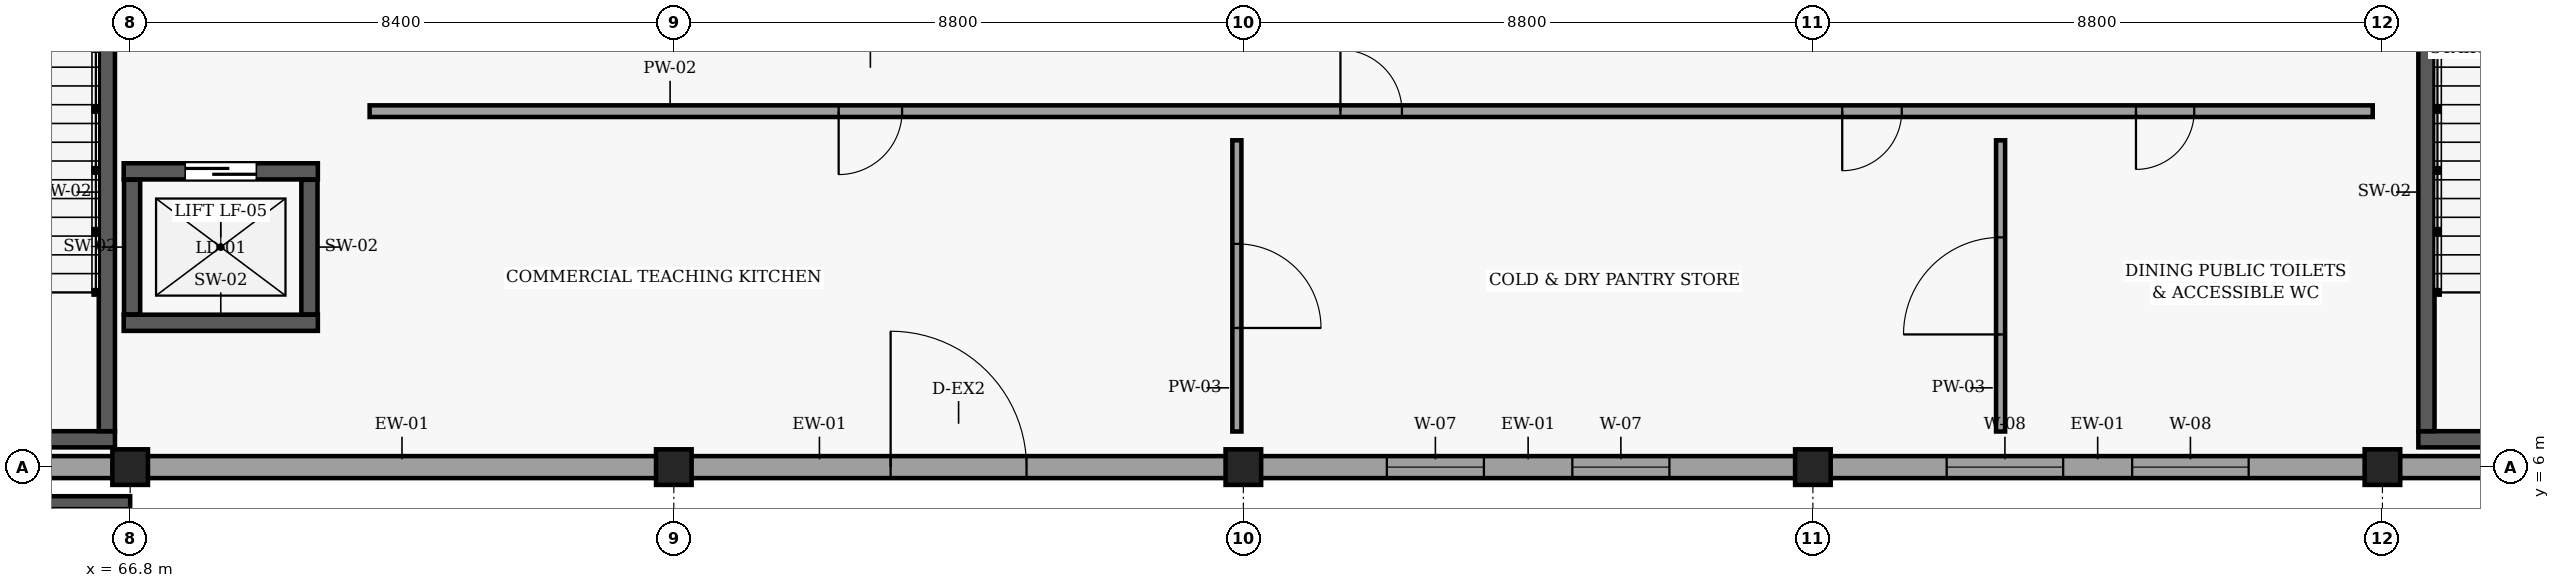
"""IFC4 building model, lengths in metres.
Left out: names, types, materials, properties, quantities, classifications, styles, units other than length and angle.
Written with IfcOpenShell. Run it as: python <this file> out.ifc"""

import sys

from ifc_helpers import new_model, si_unit, direction, frame, frame_2d, origin, origin_2d, place, context, subcontext, project, spatial, rectangle, extrude, element, fill, save


model = new_model("IFC4")
c1 = context("Model", 3, precision=1e-05, world=origin(), true_north=direction((0.0, 1.0)))
c2 = subcontext(c1, "Body", "Model", "MODEL_VIEW")
j1 = project(units=[si_unit("LENGTHUNIT", "METRE"), si_unit("PLANEANGLEUNIT", "RADIAN")], contexts=[c1])
p1 = place(None, origin())
s1 = spatial("IfcSite", under=j1, at=p1, CompositionType="ELEMENT")
p2 = place(p1, origin())
s2 = spatial("IfcBuilding", under=s1, at=p2, CompositionType="ELEMENT")
p3 = place(p2, origin())
s3 = spatial("IfcBuildingStorey", under=s2, at=p3, CompositionType="ELEMENT", Elevation=0.0)
for number, where, z_axis, x_axis in (
    (1, (66.8, 6.0, 0.0), (0.0, 0.0, 1.0), (1.0, 0.0, 0.0)),
    (2, (75.2, 6.0, 0.0), (0.0, 0.0, 1.0), (1.0, 0.0, 0.0)),
    (3, (84.0, 6.0, 0.0), (0.0, 0.0, 1.0), (1.0, 0.0, 0.0)),
    (4, (92.8, 6.0, 0.0), (0.0, 0.0, 1.0), (1.0, 0.0, 0.0)),
    (5, (101.6, 6.0, 0.0), (0.0, 0.0, 1.0), (1.0, 0.0, 0.0)),
):
    element("IfcColumn", number, at=place(p3, frame(where, z_axis=z_axis, x_axis=x_axis)), inside=s3, PredefinedType="COLUMN", context=c2, shape_type="SweptSolid", body=[
        extrude(rectangle(XDim=0.55, YDim=0.55, at=origin_2d()), origin(), (0.0, 0.0, 1.0), 4.8),
    ])
p4 = place(p3, frame((58.5, 6.0, 0.0), z_axis=(0.0, 0.0, 1.0), x_axis=(1.0, 0.0, 0.0)))
e6 = element("IfcWall", 6, at=p4, inside=s3, PredefinedType="SOLIDWALL", context=c2, shape_type="SweptSolid", body=[
    extrude(rectangle(XDim=8.2, YDim=0.34, at=frame_2d((4.1, 0.0))), origin(), (0.0, 0.0, 1.0), 4.065),
])
p5 = place(p3, frame((66.9, 6.0, 0.0), z_axis=(0.0, 0.0, 1.0), x_axis=(1.0, 0.0, 0.0)))
e7 = element("IfcWall", 7, at=p5, inside=s3, PredefinedType="SOLIDWALL", context=c2, shape_type="SweptSolid", body=[
    extrude(rectangle(XDim=8.2, YDim=0.34, at=frame_2d((4.1, 0.0))), origin(), (0.0, 0.0, 1.0), 4.065),
])
p6 = place(p3, frame((75.3, 6.0, 0.0), z_axis=(0.0, 0.0, 1.0), x_axis=(1.0, 0.0, 0.0)))
e8 = element("IfcWall", 8, at=p6, inside=s3, PredefinedType="SOLIDWALL", context=c2, shape_type="SweptSolid", body=[
    extrude(rectangle(XDim=8.6, YDim=0.34, at=frame_2d((4.3, 0.0))), origin(), (0.0, 0.0, 1.0), 4.065),
])
p7 = place(p6, frame((3.25, 0.0, 0.0)))
e9 = element("IfcOpeningElement", 9, at=p7, cuts=e8, PredefinedType="OPENING", context=c2, shape_type="SweptSolid", body=[
    extrude(rectangle(XDim=2.1, YDim=2.35, at=frame_2d((1.05, 1.175))), frame((0.0, 0.18, 0.0), z_axis=(0.0, -1.0, 0.0), x_axis=(1.0, 0.0, 0.0)), (0.0, 0.0, 1.0), 0.36),
])
p8 = place(p3, frame((84.1, 6.0, 0.0), z_axis=(0.0, 0.0, 1.0), x_axis=(1.0, 0.0, 0.0)))
e10 = element("IfcWall", 10, at=p8, inside=s3, PredefinedType="SOLIDWALL", context=c2, shape_type="SweptSolid", body=[
    extrude(rectangle(XDim=8.6, YDim=0.34, at=frame_2d((4.3, 0.0))), origin(), (0.0, 0.0, 1.0), 4.065),
])
p9 = place(p8, frame((2.117, 0.0, 1.1)))
e11 = element("IfcOpeningElement", 11, at=p9, cuts=e10, PredefinedType="OPENING", context=c2, shape_type="SweptSolid", body=[
    extrude(rectangle(XDim=1.5, YDim=1.8, at=frame_2d((0.75, 0.9))), frame((0.0, 0.18, 0.0), z_axis=(0.0, -1.0, 0.0), x_axis=(1.0, 0.0, 0.0)), (0.0, 0.0, 1.0), 0.36),
])
p10 = place(p8, frame((4.983, 0.0, 1.1)))
e12 = element("IfcOpeningElement", 12, at=p10, cuts=e10, PredefinedType="OPENING", context=c2, shape_type="SweptSolid", body=[
    extrude(rectangle(XDim=1.5, YDim=1.8, at=frame_2d((0.75, 0.9))), frame((0.0, 0.18, 0.0), z_axis=(0.0, -1.0, 0.0), x_axis=(1.0, 0.0, 0.0)), (0.0, 0.0, 1.0), 0.36),
])
p11 = place(p3, frame((92.9, 6.0, 0.0), z_axis=(0.0, 0.0, 1.0), x_axis=(1.0, 0.0, 0.0)))
e13 = element("IfcWall", 13, at=p11, inside=s3, PredefinedType="SOLIDWALL", context=c2, shape_type="SweptSolid", body=[
    extrude(rectangle(XDim=8.6, YDim=0.34, at=frame_2d((4.3, 0.0))), origin(), (0.0, 0.0, 1.0), 4.065),
])
p12 = place(p11, frame((1.967, 0.0, 1.1)))
e14 = element("IfcOpeningElement", 14, at=p12, cuts=e13, PredefinedType="OPENING", context=c2, shape_type="SweptSolid", body=[
    extrude(rectangle(XDim=1.8, YDim=1.8, at=frame_2d((0.9, 0.9))), frame((0.0, 0.18, 0.0), z_axis=(0.0, -1.0, 0.0), x_axis=(1.0, 0.0, 0.0)), (0.0, 0.0, 1.0), 0.36),
])
p13 = place(p11, frame((4.833, 0.0, 1.1)))
e15 = element("IfcOpeningElement", 15, at=p13, cuts=e13, PredefinedType="OPENING", context=c2, shape_type="SweptSolid", body=[
    extrude(rectangle(XDim=1.8, YDim=1.8, at=frame_2d((0.9, 0.9))), frame((0.0, 0.18, 0.0), z_axis=(0.0, -1.0, 0.0), x_axis=(1.0, 0.0, 0.0)), (0.0, 0.0, 1.0), 0.36),
])
p14 = place(p3, frame((101.7, 6.0, 0.0), z_axis=(0.0, 0.0, 1.0), x_axis=(1.0, 0.0, 0.0)))
e16 = element("IfcWall", 16, at=p14, inside=s3, PredefinedType="SOLIDWALL", context=c2, shape_type="SweptSolid", body=[
    extrude(rectangle(XDim=8.6, YDim=0.34, at=frame_2d((4.3, 0.0))), origin(), (0.0, 0.0, 1.0), 4.065),
])
p15 = place(p3, frame((58.4, 5.45, 0.0), z_axis=(0.0, 0.0, 1.0), x_axis=(1.0, 0.0, 0.0)))
e17 = element("IfcWall", 17, at=p15, inside=s3, PredefinedType="PARAPET", context=c2, shape_type="SweptSolid", body=[
    extrude(rectangle(XDim=8.4, YDim=0.2, at=frame_2d((4.2, 0.0))), origin(), (0.0, 0.0, 1.0), 1.2),
])
p16 = place(p3, frame((66.565, 6.43, 0.0), z_axis=(0.0, 0.0, 1.0), x_axis=(-1.0, 0.0, 0.0)))
e18 = element("IfcWall", 18, at=p16, inside=s3, PredefinedType="SHEAR", context=c2, shape_type="SweptSolid", body=[
    extrude(rectangle(XDim=3.61, YDim=0.25, at=frame_2d((1.805, 0.0))), origin(), (0.0, 0.0, 1.0), 4.56),
])
p17 = place(p3, frame((66.44, 13.945, 0.0), z_axis=(0.0, 0.0, 1.0), x_axis=(0.0, -1.0, 0.0)))
e19 = element("IfcWall", 19, at=p17, inside=s3, PredefinedType="SHEAR", context=c2, shape_type="SweptSolid", body=[
    extrude(rectangle(XDim=7.39, YDim=0.25, at=frame_2d((3.695, 0.0))), origin(), (0.0, 0.0, 1.0), 4.56),
])
p18 = place(p3, frame((66.7, 8.23, 0.0), z_axis=(0.0, 0.0, 1.0), x_axis=(1.0, 0.0, 0.0)))
e20 = element("IfcWall", 20, at=p18, inside=s3, PredefinedType="SHEAR", context=c2, shape_type="SweptSolid", body=[
    extrude(rectangle(XDim=3.0, YDim=0.25, at=frame_2d((1.5, 0.0))), origin(), (0.0, 0.0, 1.0), 4.56),
])
p19 = place(p3, frame((69.7, 10.57, 0.0), z_axis=(0.0, 0.0, 1.0), x_axis=(-1.0, 0.0, 0.0)))
e21 = element("IfcWall", 21, at=p19, inside=s3, PredefinedType="SHEAR", context=c2, shape_type="SweptSolid", body=[
    extrude(rectangle(XDim=3.0, YDim=0.25, at=frame_2d((1.5, 0.0))), origin(), (0.0, 0.0, 1.0), 4.56),
])
p20 = place(p19, frame((0.95, 0.0, 0.0)))
e22 = element("IfcOpeningElement", 22, at=p20, cuts=e21, PredefinedType="OPENING", context=c2, shape_type="SweptSolid", body=[
    extrude(rectangle(XDim=1.1, YDim=2.15, at=frame_2d((0.55, 1.075))), frame((0.0, 0.135, 0.0), z_axis=(0.0, -1.0, 0.0), x_axis=(1.0, 0.0, 0.0)), (0.0, 0.0, 1.0), 0.27),
])
for number, where, z_axis, x_axis in (
    (23, (69.57, 8.36, 0.0), (0.0, 0.0, 1.0), (0.0, 1.0, 0.0)),
    (24, (66.83, 10.44, 0.0), (0.0, 0.0, 1.0), (0.0, -1.0, 0.0)),
):
    element("IfcWall", number, at=place(p3, frame(where, z_axis=z_axis, x_axis=x_axis)), inside=s3, PredefinedType="SHEAR", context=c2, shape_type="SweptSolid", body=[
        extrude(rectangle(XDim=2.08, YDim=0.25, at=frame_2d((1.04, 0.0))), origin(), (0.0, 0.0, 1.0), 4.56),
    ])
p21 = place(p3, frame((105.765, 6.43, 0.0), z_axis=(0.0, 0.0, 1.0), x_axis=(-1.0, 0.0, 0.0)))
e25 = element("IfcWall", 25, at=p21, inside=s3, PredefinedType="SHEAR", context=c2, shape_type="SweptSolid", body=[
    extrude(rectangle(XDim=3.61, YDim=0.25, at=frame_2d((1.805, 0.0))), origin(), (0.0, 0.0, 1.0), 4.56),
])
p22 = place(p3, frame((102.28, 6.555, 0.0), z_axis=(0.0, 0.0, 1.0), x_axis=(0.0, 1.0, 0.0)))
e26 = element("IfcWall", 26, at=p22, inside=s3, PredefinedType="SHEAR", context=c2, shape_type="SweptSolid", body=[
    extrude(rectangle(XDim=7.39, YDim=0.25, at=frame_2d((3.695, 0.0))), origin(), (0.0, 0.0, 1.0), 4.56),
])
p23 = place(p3, frame((70.5, 11.5, 0.0), z_axis=(0.0, 0.0, 1.0), x_axis=(1.0, 0.0, 0.0)))
e27 = element("IfcWall", 27, at=p23, inside=s3, PredefinedType="PARTITIONING", context=c2, shape_type="SweptSolid", body=[
    extrude(rectangle(XDim=30.95, YDim=0.18, at=frame_2d((15.475, 0.0))), origin(), (0.0, 0.0, 1.0), 3.845),
])
p24 = place(p23, frame((7.247, 0.0, 0.0)))
e28 = element("IfcOpeningElement", 28, at=p24, cuts=e27, PredefinedType="OPENING", context=c2, shape_type="SweptSolid", body=[
    extrude(rectangle(XDim=0.98, YDim=2.12, at=frame_2d((0.49, 1.06))), frame((0.0, 0.1, 0.0), z_axis=(0.0, -1.0, 0.0), x_axis=(1.0, 0.0, 0.0)), (0.0, 0.0, 1.0), 0.2),
])
p25 = place(p23, frame((15.0, 0.0, 0.0)))
e29 = element("IfcOpeningElement", 29, at=p25, cuts=e27, PredefinedType="OPENING", context=c2, shape_type="SweptSolid", body=[
    extrude(rectangle(XDim=0.95, YDim=2.12, at=frame_2d((0.475, 1.06))), frame((0.0, 0.1, 0.0), z_axis=(0.0, -1.0, 0.0), x_axis=(1.0, 0.0, 0.0)), (0.0, 0.0, 1.0), 0.2),
])
p26 = place(p23, frame((22.753, 0.0, 0.0)))
e30 = element("IfcOpeningElement", 30, at=p26, cuts=e27, PredefinedType="OPENING", context=c2, shape_type="SweptSolid", body=[
    extrude(rectangle(XDim=0.92, YDim=2.1, at=frame_2d((0.46, 1.05))), frame((0.0, 0.1, 0.0), z_axis=(0.0, -1.0, 0.0), x_axis=(1.0, 0.0, 0.0)), (0.0, 0.0, 1.0), 0.2),
])
p27 = place(p23, frame((27.292, 0.0, 0.0)))
e31 = element("IfcOpeningElement", 31, at=p27, cuts=e27, PredefinedType="OPENING", context=c2, shape_type="SweptSolid", body=[
    extrude(rectangle(XDim=0.9, YDim=2.06, at=frame_2d((0.45, 1.03))), frame((0.0, 0.1, 0.0), z_axis=(0.0, -1.0, 0.0), x_axis=(1.0, 0.0, 0.0)), (0.0, 0.0, 1.0), 0.2),
])
p28 = place(p3, frame((83.9, 6.55, 0.0), z_axis=(0.0, 0.0, 1.0), x_axis=(0.0, 1.0, 0.0)))
e32 = element("IfcWall", 32, at=p28, inside=s3, PredefinedType="PARTITIONING", context=c2, shape_type="SweptSolid", body=[
    extrude(rectangle(XDim=4.5, YDim=0.14, at=frame_2d((2.25, 0.0))), origin(), (0.0, 0.0, 1.0), 3.845),
])
p29 = place(p28, frame((1.6, 0.0, 0.0)))
e33 = element("IfcOpeningElement", 33, at=p29, cuts=e32, PredefinedType="OPENING", context=c2, shape_type="SweptSolid", body=[
    extrude(rectangle(XDim=1.3, YDim=2.2, at=frame_2d((0.65, 1.1))), frame((0.0, 0.08, 0.0), z_axis=(0.0, -1.0, 0.0), x_axis=(1.0, 0.0, 0.0)), (0.0, 0.0, 1.0), 0.16),
])
p30 = place(p3, frame((95.7, 6.55, 0.0), z_axis=(0.0, 0.0, 1.0), x_axis=(0.0, 1.0, 0.0)))
e34 = element("IfcWall", 34, at=p30, inside=s3, PredefinedType="PARTITIONING", context=c2, shape_type="SweptSolid", body=[
    extrude(rectangle(XDim=4.5, YDim=0.14, at=frame_2d((2.25, 0.0))), origin(), (0.0, 0.0, 1.0), 4.025),
])
p31 = place(p30, frame((1.5, 0.0, 0.0)))
e35 = element("IfcOpeningElement", 35, at=p31, cuts=e34, PredefinedType="OPENING", context=c2, shape_type="SweptSolid", body=[
    extrude(rectangle(XDim=1.5, YDim=2.25, at=frame_2d((0.75, 1.125))), frame((0.0, 0.08, 0.0), z_axis=(0.0, -1.0, 0.0), x_axis=(1.0, 0.0, 0.0)), (0.0, 0.0, 1.0), 0.16),
])
p32 = place(p9, origin())
e36 = element("IfcWindow", 36, at=p32, inside=s3, PartitioningType="SINGLE_PANEL", PredefinedType="WINDOW", context=c2, shape_type="SweptSolid", body=[
    extrude(rectangle(XDim=1.5, YDim=1.8, at=frame_2d((0.75, 0.9))), frame((0.0, 0.03, 0.0), z_axis=(0.0, -1.0, 0.0), x_axis=(1.0, 0.0, 0.0)), (0.0, 0.0, 1.0), 0.06),
])
fill(e11, e36)
p33 = place(p10, origin())
e37 = element("IfcWindow", 37, at=p33, inside=s3, PartitioningType="SINGLE_PANEL", PredefinedType="WINDOW", context=c2, shape_type="SweptSolid", body=[
    extrude(rectangle(XDim=1.5, YDim=1.8, at=frame_2d((0.75, 0.9))), frame((0.0, 0.03, 0.0), z_axis=(0.0, -1.0, 0.0), x_axis=(1.0, 0.0, 0.0)), (0.0, 0.0, 1.0), 0.06),
])
fill(e12, e37)
p34 = place(p12, origin())
e38 = element("IfcWindow", 38, at=p34, inside=s3, PartitioningType="SINGLE_PANEL", PredefinedType="WINDOW", context=c2, shape_type="SweptSolid", body=[
    extrude(rectangle(XDim=1.8, YDim=1.8, at=frame_2d((0.9, 0.9))), frame((0.0, 0.03, 0.0), z_axis=(0.0, -1.0, 0.0), x_axis=(1.0, 0.0, 0.0)), (0.0, 0.0, 1.0), 0.06),
])
fill(e14, e38)
p35 = place(p13, origin())
e39 = element("IfcWindow", 39, at=p35, inside=s3, PartitioningType="SINGLE_PANEL", PredefinedType="WINDOW", context=c2, shape_type="SweptSolid", body=[
    extrude(rectangle(XDim=1.8, YDim=1.8, at=frame_2d((0.9, 0.9))), frame((0.0, 0.03, 0.0), z_axis=(0.0, -1.0, 0.0), x_axis=(1.0, 0.0, 0.0)), (0.0, 0.0, 1.0), 0.06),
])
fill(e15, e39)
p36 = place(p20, origin())
e40 = element("IfcDoor", 40, at=p36, inside=s3, OperationType="SLIDING_TO_LEFT", PredefinedType="DOOR", context=c2, shape_type="SweptSolid", body=[
    extrude(rectangle(XDim=1.1, YDim=2.15, at=frame_2d((0.55, 1.075))), frame((0.0, 0.025, 0.0), z_axis=(0.0, -1.0, 0.0), x_axis=(1.0, 0.0, 0.0)), (0.0, 0.0, 1.0), 0.05),
])
fill(e22, e40)
p37 = place(p7, origin())
e41 = element("IfcDoor", 41, at=p37, inside=s3, OperationType="DOUBLE_DOOR_SINGLE_SWING", PredefinedType="DOOR", context=c2, shape_type="SweptSolid", body=[
    extrude(rectangle(XDim=2.1, YDim=2.35, at=frame_2d((1.05, 1.175))), frame((0.0, 0.025, 0.0), z_axis=(0.0, -1.0, 0.0), x_axis=(1.0, 0.0, 0.0)), (0.0, 0.0, 1.0), 0.05),
])
fill(e9, e41)
p38 = place(p24, origin())
e42 = element("IfcDoor", 42, at=p38, inside=s3, OperationType="SINGLE_SWING_RIGHT", PredefinedType="DOOR", context=c2, shape_type="SweptSolid", body=[
    extrude(rectangle(XDim=0.98, YDim=2.12, at=frame_2d((0.49, 1.06))), frame((0.0, 0.025, 0.0), z_axis=(0.0, -1.0, 0.0), x_axis=(1.0, 0.0, 0.0)), (0.0, 0.0, 1.0), 0.05),
])
fill(e28, e42)
p39 = place(p25, origin())
e43 = element("IfcDoor", 43, at=p39, inside=s3, OperationType="SINGLE_SWING_LEFT", PredefinedType="DOOR", context=c2, shape_type="SweptSolid", body=[
    extrude(rectangle(XDim=0.95, YDim=2.12, at=frame_2d((0.475, 1.06))), frame((0.0, 0.025, 0.0), z_axis=(0.0, -1.0, 0.0), x_axis=(1.0, 0.0, 0.0)), (0.0, 0.0, 1.0), 0.05),
])
fill(e29, e43)
p40 = place(p26, origin())
e44 = element("IfcDoor", 44, at=p40, inside=s3, OperationType="SINGLE_SWING_RIGHT", PredefinedType="DOOR", context=c2, shape_type="SweptSolid", body=[
    extrude(rectangle(XDim=0.92, YDim=2.1, at=frame_2d((0.46, 1.05))), frame((0.0, 0.025, 0.0), z_axis=(0.0, -1.0, 0.0), x_axis=(1.0, 0.0, 0.0)), (0.0, 0.0, 1.0), 0.05),
])
fill(e30, e44)
p41 = place(p29, origin())
e45 = element("IfcDoor", 45, at=p41, inside=s3, OperationType="SINGLE_SWING_RIGHT", PredefinedType="DOOR", context=c2, shape_type="SweptSolid", body=[
    extrude(rectangle(XDim=1.3, YDim=2.2, at=frame_2d((0.65, 1.1))), frame((0.0, 0.025, 0.0), z_axis=(0.0, -1.0, 0.0), x_axis=(1.0, 0.0, 0.0)), (0.0, 0.0, 1.0), 0.05),
])
fill(e33, e45)
p42 = place(p31, origin())
e46 = element("IfcDoor", 46, at=p42, inside=s3, OperationType="DOUBLE_DOOR_SINGLE_SWING", PredefinedType="DOOR", context=c2, shape_type="SweptSolid", body=[
    extrude(rectangle(XDim=1.5, YDim=2.25, at=frame_2d((0.75, 1.125))), frame((0.0, 0.025, 0.0), z_axis=(0.0, -1.0, 0.0), x_axis=(1.0, 0.0, 0.0)), (0.0, 0.0, 1.0), 0.05),
])
fill(e35, e46)
p43 = place(p27, origin())
e47 = element("IfcDoor", 47, at=p43, inside=s3, OperationType="SINGLE_SWING_RIGHT", PredefinedType="DOOR", context=c2, shape_type="SweptSolid", body=[
    extrude(rectangle(XDim=0.9, YDim=2.06, at=frame_2d((0.45, 1.03))), frame((0.0, 0.025, 0.0), z_axis=(0.0, -1.0, 0.0), x_axis=(1.0, 0.0, 0.0)), (0.0, 0.0, 1.0), 0.05),
])
fill(e31, e47)
save(model, sys.argv[1])
